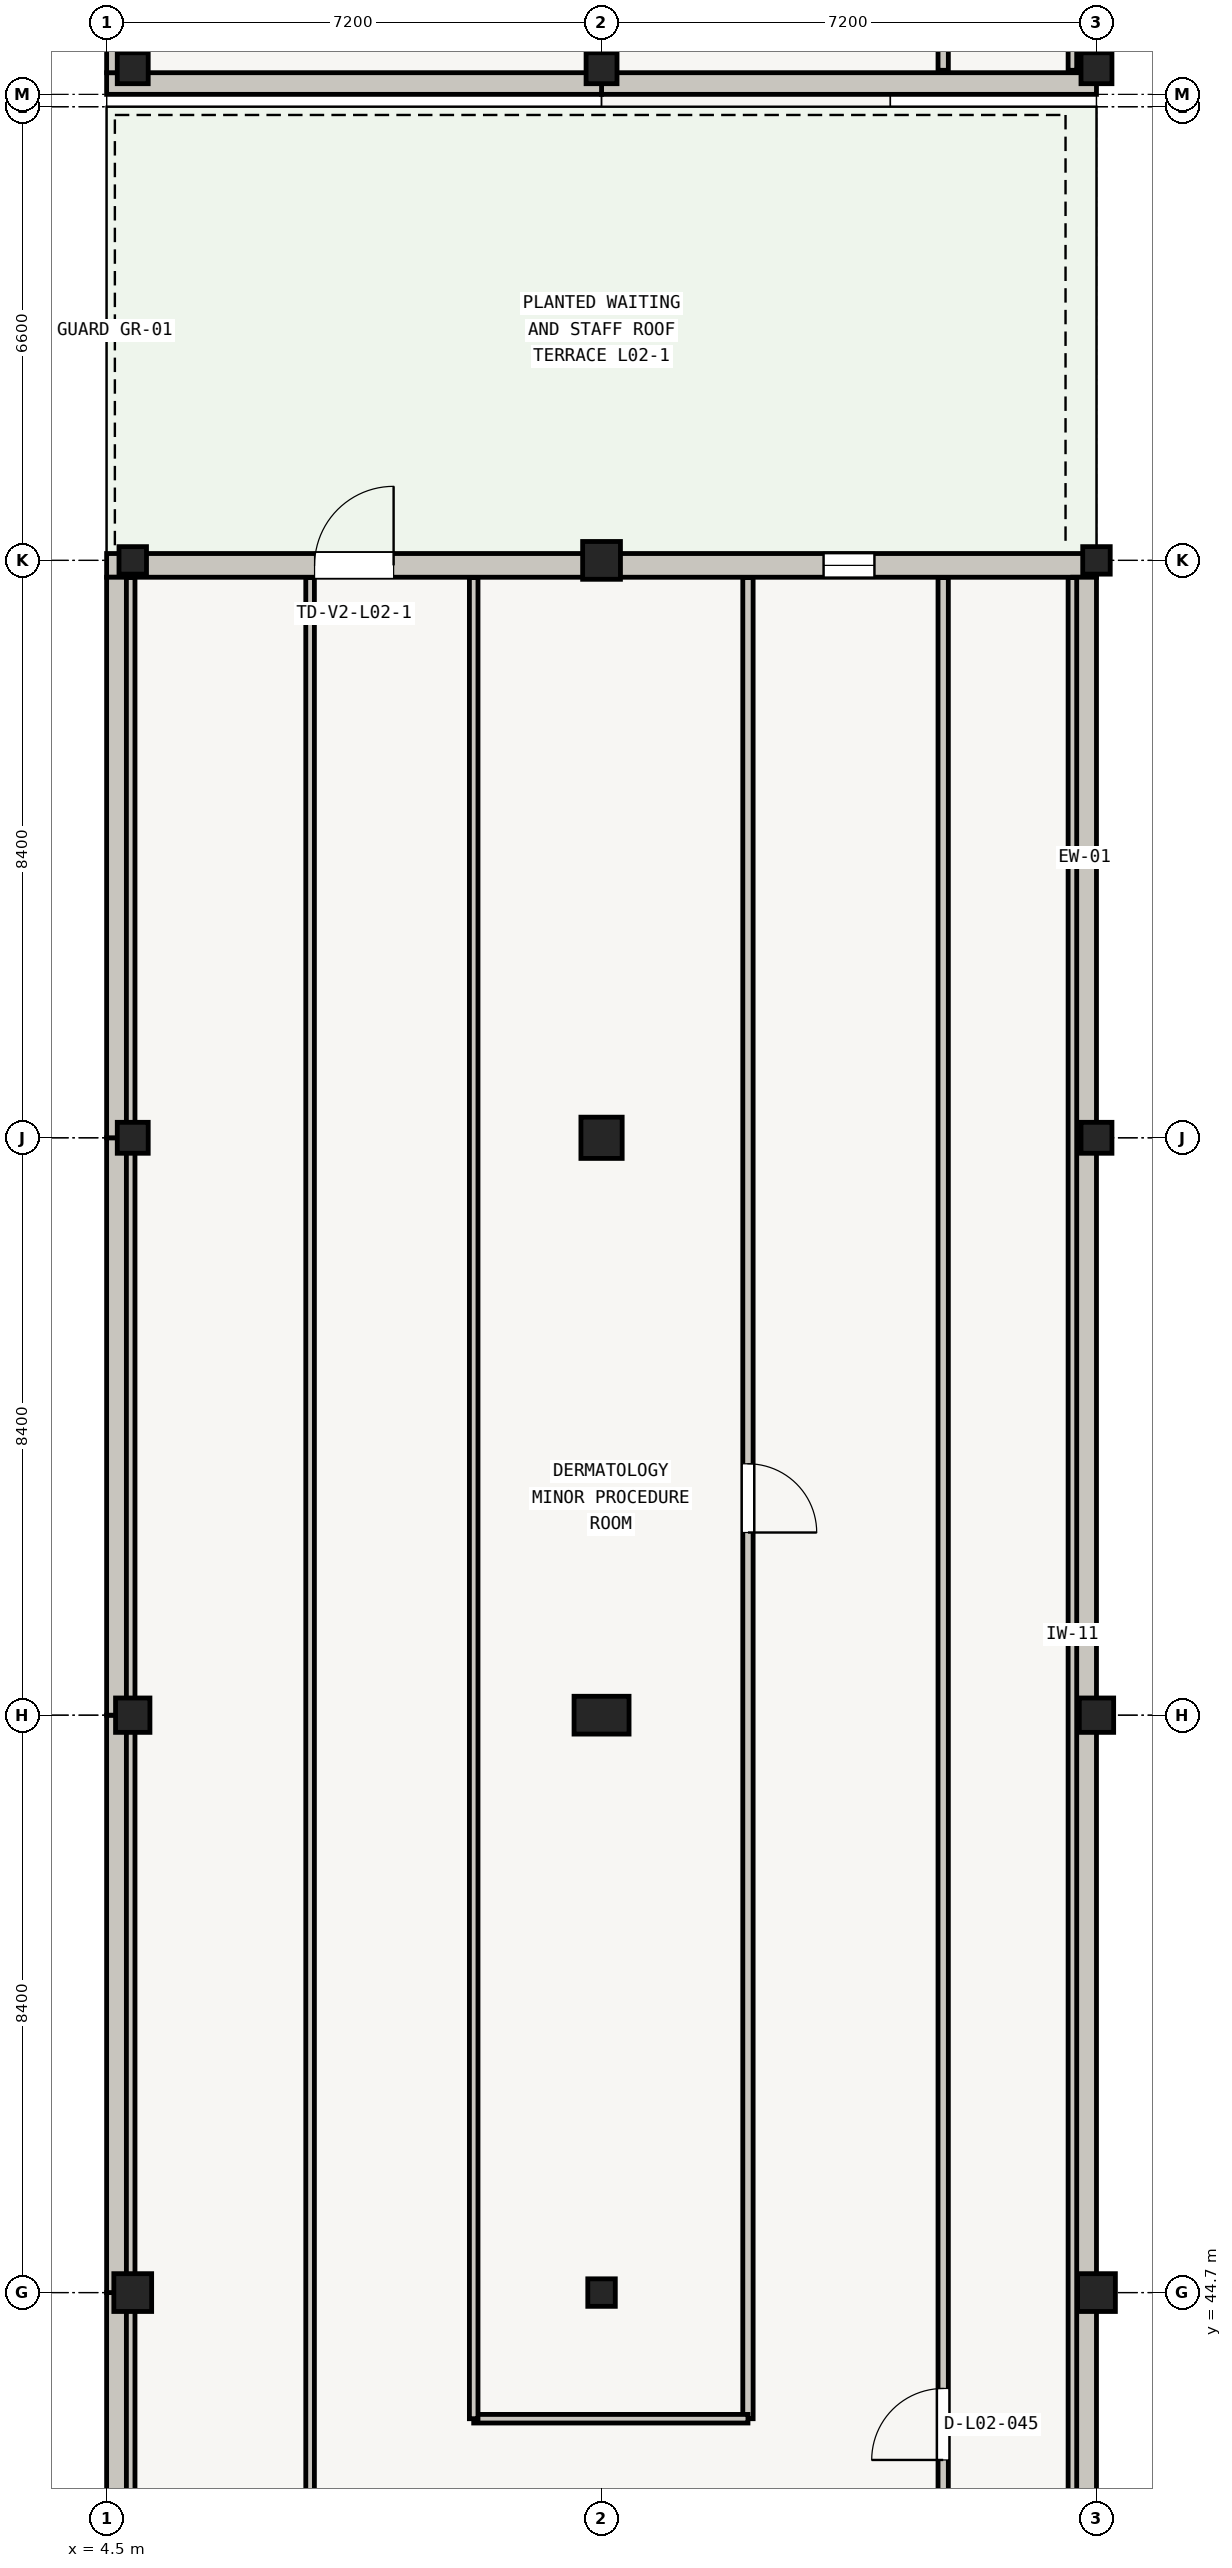
"""IFC4 building model, lengths in metres.
Left out: names, types, materials, properties, quantities, classifications, styles, units other than length and angle.
Written with IfcOpenShell. Run it as: python <this file> out.ifc"""

import sys

from ifc_helpers import new_model, si_unit, direction, frame, frame_2d, origin, origin_2d, place, context, subcontext, project, spatial, rectangle, extrude, element, fill, save


model = new_model("IFC4")
c1 = context("Model", 3, precision=1e-05, world=origin(), true_north=direction((0.0, 1.0)))
c2 = subcontext(c1, "Body", "Model", "MODEL_VIEW")
j1 = project(units=[si_unit("LENGTHUNIT", "METRE"), si_unit("PLANEANGLEUNIT", "RADIAN")], contexts=[c1])
p1 = place(None, origin())
s1 = spatial("IfcSite", under=j1, at=p1, CompositionType="ELEMENT")
p2 = place(p1, origin())
s2 = spatial("IfcBuilding", under=s1, at=p2, CompositionType="ELEMENT")
p3 = place(p2, frame((0.0, 0.0, 8.7)))
s3 = spatial("IfcBuildingStorey", under=s2, at=p3, CompositionType="ELEMENT", Elevation=8.7)
p4 = place(p3, frame((4.88, 44.7, 0.0), z_axis=(0.0, 0.0, 1.0), x_axis=(1.0, 0.0, 0.0)))
e1 = element("IfcColumn", 1, at=p4, inside=s3, PredefinedType="COLUMN", context=c2, shape_type="SweptSolid", body=[
    extrude(rectangle(XDim=0.55, YDim=0.55, at=origin_2d()), origin(), (0.0, 0.0, 1.0), 3.92),
])
p5 = place(p3, frame((4.88, 53.1, 0.0), z_axis=(0.0, 0.0, 1.0), x_axis=(1.0, 0.0, 0.0)))
e2 = element("IfcColumn", 2, at=p5, inside=s3, PredefinedType="COLUMN", context=c2, shape_type="SweptSolid", body=[
    extrude(rectangle(XDim=0.5, YDim=0.5, at=origin_2d()), origin(), (0.0, 0.0, 1.0), 3.92),
])
p6 = place(p3, frame((4.88, 61.5, 0.0), z_axis=(0.0, 0.0, 1.0), x_axis=(1.0, 0.0, 0.0)))
e3 = element("IfcColumn", 3, at=p6, inside=s3, PredefinedType="COLUMN", context=c2, shape_type="SweptSolid", body=[
    extrude(rectangle(XDim=0.45, YDim=0.45, at=origin_2d()), origin(), (0.0, 0.0, 1.0), 3.92),
])
for number, where, z_axis, x_axis in (
    (4, (4.88, 69.9, 0.0), (0.0, 0.0, 1.0), (1.0, 0.0, 0.0)),
    (5, (11.7, 44.7, 0.0), (0.0, 0.0, 1.0), (1.0, 0.0, 0.0)),
):
    element("IfcColumn", number, at=place(p3, frame(where, z_axis=z_axis, x_axis=x_axis)), inside=s3, PredefinedType="COLUMN", context=c2, shape_type="SweptSolid", body=[
        extrude(rectangle(XDim=0.4, YDim=0.4, at=origin_2d()), origin(), (0.0, 0.0, 1.0), 3.92),
    ])
p7 = place(p3, frame((11.7, 53.1, 0.0), z_axis=(0.0, 0.0, 1.0), x_axis=(1.0, 0.0, 0.0)))
e6 = element("IfcColumn", 6, at=p7, inside=s3, PredefinedType="COLUMN", context=c2, shape_type="SweptSolid", body=[
    extrude(rectangle(XDim=0.8, YDim=0.55, at=origin_2d()), origin(), (0.0, 0.0, 1.0), 3.92),
])
p8 = place(p3, frame((11.7, 61.5, 0.0), z_axis=(0.0, 0.0, 1.0), x_axis=(1.0, 0.0, 0.0)))
e7 = element("IfcColumn", 7, at=p8, inside=s3, PredefinedType="COLUMN", context=c2, shape_type="SweptSolid", body=[
    extrude(rectangle(XDim=0.6, YDim=0.6, at=origin_2d()), origin(), (0.0, 0.0, 1.0), 3.92),
])
for number, where, z_axis, x_axis in (
    (8, (11.7, 69.9, 0.0), (0.0, 0.0, 1.0), (1.0, 0.0, 0.0)),
    (9, (18.9, 44.7, 0.0), (0.0, 0.0, 1.0), (1.0, 0.0, 0.0)),
):
    element("IfcColumn", number, at=place(p3, frame(where, z_axis=z_axis, x_axis=x_axis)), inside=s3, PredefinedType="COLUMN", context=c2, shape_type="SweptSolid", body=[
        extrude(rectangle(XDim=0.55, YDim=0.55, at=origin_2d()), origin(), (0.0, 0.0, 1.0), 3.92),
    ])
p9 = place(p3, frame((18.9, 53.1, 0.0), z_axis=(0.0, 0.0, 1.0), x_axis=(1.0, 0.0, 0.0)))
e10 = element("IfcColumn", 10, at=p9, inside=s3, PredefinedType="COLUMN", context=c2, shape_type="SweptSolid", body=[
    extrude(rectangle(XDim=0.5, YDim=0.5, at=origin_2d()), origin(), (0.0, 0.0, 1.0), 3.92),
])
p10 = place(p3, frame((18.9, 61.5, 0.0), z_axis=(0.0, 0.0, 1.0), x_axis=(1.0, 0.0, 0.0)))
e11 = element("IfcColumn", 11, at=p10, inside=s3, PredefinedType="COLUMN", context=c2, shape_type="SweptSolid", body=[
    extrude(rectangle(XDim=0.45, YDim=0.45, at=origin_2d()), origin(), (0.0, 0.0, 1.0), 3.92),
])
p11 = place(p3, frame((18.9, 69.9, 0.0), z_axis=(0.0, 0.0, 1.0), x_axis=(1.0, 0.0, 0.0)))
e12 = element("IfcColumn", 12, at=p11, inside=s3, PredefinedType="COLUMN", context=c2, shape_type="SweptSolid", body=[
    extrude(rectangle(XDim=0.4, YDim=0.4, at=origin_2d()), origin(), (0.0, 0.0, 1.0), 3.92),
])
for number, where, z_axis, x_axis in (
    (13, (4.88, 77.06, 0.0), (0.0, 0.0, 1.0), (1.0, 0.0, 0.0)),
    (14, (11.7, 77.06, 0.0), (0.0, 0.0, 1.0), (1.0, 0.0, 0.0)),
    (15, (18.9, 77.06, 0.0), (0.0, 0.0, 1.0), (1.0, 0.0, 0.0)),
):
    element("IfcColumn", number, at=place(p3, frame(where, z_axis=z_axis, x_axis=x_axis)), inside=s3, PredefinedType="COLUMN", context=c2, shape_type="SweptSolid", body=[
        extrude(rectangle(XDim=0.45, YDim=0.45, at=origin_2d()), origin(), (0.0, 0.0, 1.0), 3.935),
    ])
p12 = place(p3, frame((4.5, 69.827, 0.0), z_axis=(0.0, 0.0, 1.0), x_axis=(1.0, 0.0, 0.0)))
e16 = element("IfcWall", 16, at=p12, inside=s3, PredefinedType="SOLIDWALL", context=c2, shape_type="SweptSolid", body=[
    extrude(rectangle(XDim=7.2, YDim=0.345, at=frame_2d((3.6, 0.0))), origin(), (0.0, 0.0, 1.0), 3.405),
])
p13 = place(p12, frame((3.025, 0.0, 0.19)))
e17 = element("IfcOpeningElement", 17, at=p13, cuts=e16, PredefinedType="OPENING", context=c2, shape_type="SweptSolid", body=[
    extrude(rectangle(XDim=1.15, YDim=2.02, at=frame_2d((0.575, 1.01))), frame((0.0, 0.172, 0.0), z_axis=(0.0, -1.0, 0.0), x_axis=(1.0, 0.0, 0.0)), (0.0, 0.0, 1.0), 0.345),
])
p14 = place(p3, frame((11.7, 69.827, 0.0), z_axis=(0.0, 0.0, 1.0), x_axis=(1.0, 0.0, 0.0)))
e18 = element("IfcWall", 18, at=p14, inside=s3, PredefinedType="SOLIDWALL", context=c2, shape_type="SweptSolid", body=[
    extrude(rectangle(XDim=7.2, YDim=0.345, at=frame_2d((3.6, 0.0))), origin(), (0.0, 0.0, 1.0), 3.105),
])
p15 = place(p14, frame((3.23, 0.0, 0.55)))
e19 = element("IfcOpeningElement", 19, at=p15, cuts=e18, PredefinedType="OPENING", context=c2, shape_type="SweptSolid", body=[
    extrude(rectangle(XDim=0.74, YDim=2.04, at=frame_2d((0.37, 1.02))), frame((0.0, 0.172, 0.0), z_axis=(0.0, -1.0, 0.0), x_axis=(1.0, 0.0, 0.0)), (0.0, 0.0, 1.0), 0.345),
])
p16 = place(p3, frame((18.728, 69.655, 0.0), z_axis=(0.0, 0.0, 1.0), x_axis=(0.0, -1.0, 0.0)))
e20 = element("IfcWall", 20, at=p16, inside=s3, PredefinedType="SOLIDWALL", context=c2, shape_type="SweptSolid", body=[
    extrude(rectangle(XDim=8.155, YDim=0.345, at=frame_2d((4.078, 0.0))), origin(), (0.0, 0.0, 1.0), 2.955),
])
p17 = place(p3, frame((18.728, 61.5, 0.0), z_axis=(0.0, 0.0, 1.0), x_axis=(0.0, -1.0, 0.0)))
e21 = element("IfcWall", 21, at=p17, inside=s3, PredefinedType="SOLIDWALL", context=c2, shape_type="SweptSolid", body=[
    extrude(rectangle(XDim=8.4, YDim=0.345, at=frame_2d((4.2, 0.0))), origin(), (0.0, 0.0, 1.0), 2.955),
])
p18 = place(p3, frame((18.728, 53.1, 0.0), z_axis=(0.0, 0.0, 1.0), x_axis=(0.0, -1.0, 0.0)))
e22 = element("IfcWall", 22, at=p18, inside=s3, PredefinedType="SOLIDWALL", context=c2, shape_type="SweptSolid", body=[
    extrude(rectangle(XDim=8.4, YDim=0.345, at=frame_2d((4.2, 0.0))), origin(), (0.0, 0.0, 1.0), 3.105),
])
p19 = place(p3, frame((18.728, 44.7, 0.0), z_axis=(0.0, 0.0, 1.0), x_axis=(0.0, -1.0, 0.0)))
e23 = element("IfcWall", 23, at=p19, inside=s3, PredefinedType="SOLIDWALL", context=c2, shape_type="SweptSolid", body=[
    extrude(rectangle(XDim=8.4, YDim=0.345, at=frame_2d((4.2, 0.0))), origin(), (0.0, 0.0, 1.0), 3.185),
])
p20 = place(p3, frame((4.673, 36.3, 0.0), z_axis=(0.0, 0.0, 1.0), x_axis=(0.0, 1.0, 0.0)))
e24 = element("IfcWall", 24, at=p20, inside=s3, PredefinedType="SOLIDWALL", context=c2, shape_type="SweptSolid", body=[
    extrude(rectangle(XDim=8.4, YDim=0.345, at=frame_2d((4.2, 0.0))), origin(), (0.0, 0.0, 1.0), 2.955),
])
p21 = place(p3, frame((4.673, 44.7, 0.0), z_axis=(0.0, 0.0, 1.0), x_axis=(0.0, 1.0, 0.0)))
e25 = element("IfcWall", 25, at=p21, inside=s3, PredefinedType="SOLIDWALL", context=c2, shape_type="SweptSolid", body=[
    extrude(rectangle(XDim=8.4, YDim=0.345, at=frame_2d((4.2, 0.0))), origin(), (0.0, 0.0, 1.0), 2.955),
])
p22 = place(p3, frame((4.673, 53.1, 0.0), z_axis=(0.0, 0.0, 1.0), x_axis=(0.0, 1.0, 0.0)))
e26 = element("IfcWall", 26, at=p22, inside=s3, PredefinedType="SOLIDWALL", context=c2, shape_type="SweptSolid", body=[
    extrude(rectangle(XDim=8.4, YDim=0.345, at=frame_2d((4.2, 0.0))), origin(), (0.0, 0.0, 1.0), 3.325),
])
p23 = place(p3, frame((4.673, 61.5, 0.0), z_axis=(0.0, 0.0, 1.0), x_axis=(0.0, 1.0, 0.0)))
e27 = element("IfcWall", 27, at=p23, inside=s3, PredefinedType="SOLIDWALL", context=c2, shape_type="SweptSolid", body=[
    extrude(rectangle(XDim=8.155, YDim=0.345, at=frame_2d((4.078, 0.0))), origin(), (0.0, 0.0, 1.0), 3.355),
])
for number, where, z_axis, x_axis in (
    (28, (18.9, 76.837, 0.0), (0.0, 0.0, 1.0), (-1.0, 0.0, 0.0)),
    (29, (11.7, 76.837, 0.0), (0.0, 0.0, 1.0), (-1.0, 0.0, 0.0)),
):
    element("IfcWall", number, at=place(p3, frame(where, z_axis=z_axis, x_axis=x_axis)), inside=s3, PredefinedType="SOLIDWALL", context=c2, shape_type="SweptSolid", body=[
        extrude(rectangle(XDim=7.2, YDim=0.315, at=frame_2d((3.6, 0.0))), origin(), (0.0, 0.0, 1.0), 3.32),
    ])
p24 = place(p3, frame((4.657, 76.995, 0.0), z_axis=(0.0, 0.0, 1.0), x_axis=(0.0, 1.0, 0.0)))
e30 = element("IfcWall", 30, at=p24, inside=s3, PredefinedType="SOLIDWALL", context=c2, shape_type="SweptSolid", body=[
    extrude(rectangle(XDim=9.705, YDim=0.315, at=frame_2d((4.853, 0.0))), origin(), (0.0, 0.0, 1.0), 3.27),
])
p25 = place(p24, frame((1.959, 0.0, 0.55)))
e31 = element("IfcOpeningElement", 31, at=p25, cuts=e30, PredefinedType="OPENING", context=c2, shape_type="SweptSolid", body=[
    extrude(rectangle(XDim=0.74, YDim=2.25, at=frame_2d((0.37, 1.125))), frame((0.0, 0.157, 0.0), z_axis=(0.0, -1.0, 0.0), x_axis=(1.0, 0.0, 0.0)), (0.0, 0.0, 1.0), 0.315),
])
p26 = place(p24, frame((4.482, 0.0, 0.55)))
e32 = element("IfcOpeningElement", 32, at=p26, cuts=e30, PredefinedType="OPENING", context=c2, shape_type="SweptSolid", body=[
    extrude(rectangle(XDim=0.74, YDim=2.25, at=frame_2d((0.37, 1.125))), frame((0.0, 0.157, 0.0), z_axis=(0.0, -1.0, 0.0), x_axis=(1.0, 0.0, 0.0)), (0.0, 0.0, 1.0), 0.315),
])
p27 = place(p24, frame((7.006, 0.0, 0.55)))
e33 = element("IfcOpeningElement", 33, at=p27, cuts=e30, PredefinedType="OPENING", context=c2, shape_type="SweptSolid", body=[
    extrude(rectangle(XDim=0.74, YDim=2.25, at=frame_2d((0.37, 1.125))), frame((0.0, 0.157, 0.0), z_axis=(0.0, -1.0, 0.0), x_axis=(1.0, 0.0, 0.0)), (0.0, 0.0, 1.0), 0.315),
])
p28 = place(p3, frame((16.67, 15.92, 0.0), z_axis=(0.0, 0.0, 1.0), x_axis=(0.0, 1.0, 0.0)))
e34 = element("IfcWall", 34, at=p28, inside=s3, PredefinedType="PARTITIONING", context=c2, shape_type="SweptSolid", body=[
    extrude(rectangle(XDim=53.73, YDim=0.15, at=frame_2d((26.865, 0.0))), origin(), (0.0, 0.0, 1.0), 2.94),
])
p29 = place(p28, frame((26.345, 0.0, 0.0)))
e35 = element("IfcOpeningElement", 35, at=p29, cuts=e34, PredefinedType="OPENING", context=c2, shape_type="SweptSolid", body=[
    extrude(rectangle(XDim=1.04, YDim=2.05, at=frame_2d((0.52, 1.025))), frame((0.0, 0.075, 0.0), z_axis=(0.0, -1.0, 0.0), x_axis=(1.0, 0.0, 0.0)), (0.0, 0.0, 1.0), 0.15),
])
p30 = place(p3, frame((18.55, 69.65, 0.0), z_axis=(0.0, 0.0, 1.0), x_axis=(0.0, -1.0, 0.0)))
e36 = element("IfcWall", 36, at=p30, inside=s3, PredefinedType="PARTITIONING", context=c2, shape_type="SweptSolid", body=[
    extrude(rectangle(XDim=50.75, YDim=0.125, at=frame_2d((25.375, 0.0))), origin(), (0.0, 0.0, 1.0), 2.94),
])
p31 = place(p3, frame((7.46, 69.65, 0.0), z_axis=(0.0, 0.0, 1.0), x_axis=(0.0, -1.0, 0.0)))
e37 = element("IfcWall", 37, at=p31, inside=s3, PredefinedType="PARTITIONING", context=c2, shape_type="SweptSolid", body=[
    extrude(rectangle(XDim=43.8, YDim=0.125, at=frame_2d((21.9, 0.0))), origin(), (0.0, 0.0, 1.0), 2.94),
])
p32 = place(p3, frame((4.85, 15.92, 0.0), z_axis=(0.0, 0.0, 1.0), x_axis=(0.0, 1.0, 0.0)))
e38 = element("IfcWall", 38, at=p32, inside=s3, PredefinedType="PARTITIONING", context=c2, shape_type="SweptSolid", body=[
    extrude(rectangle(XDim=53.73, YDim=0.125, at=frame_2d((26.865, 0.0))), origin(), (0.0, 0.0, 1.0), 2.94),
])
p33 = place(p3, frame((13.83, 69.65, 0.0), z_axis=(0.0, 0.0, 1.0), x_axis=(0.0, -1.0, 0.0)))
e39 = element("IfcWall", 39, at=p33, inside=s3, PredefinedType="PARTITIONING", context=c2, shape_type="SweptSolid", body=[
    extrude(rectangle(XDim=26.785, YDim=0.15, at=frame_2d((13.393, 0.0))), origin(), (0.0, 0.0, 1.0), 2.94),
])
p34 = place(p33, frame((12.893, 0.0, 0.0)))
e40 = element("IfcOpeningElement", 40, at=p34, cuts=e39, PredefinedType="OPENING", context=c2, shape_type="SweptSolid", body=[
    extrude(rectangle(XDim=1.0, YDim=2.05, at=frame_2d((0.5, 1.025))), frame((0.0, 0.075, 0.0), z_axis=(0.0, -1.0, 0.0), x_axis=(1.0, 0.0, 0.0)), (0.0, 0.0, 1.0), 0.15),
])
p35 = place(p3, frame((13.83, 42.865, 0.0), z_axis=(0.0, 0.0, 1.0), x_axis=(-1.0, 0.0, 0.0)))
e41 = element("IfcWall", 41, at=p35, inside=s3, PredefinedType="PARTITIONING", context=c2, shape_type="SweptSolid", body=[
    extrude(rectangle(XDim=3.99, YDim=0.125, at=frame_2d((1.995, 0.0))), origin(), (0.0, 0.0, 1.0), 2.94),
])
p36 = place(p3, frame((9.84, 42.865, 0.0), z_axis=(0.0, 0.0, 1.0), x_axis=(0.0, 1.0, 0.0)))
e42 = element("IfcWall", 42, at=p36, inside=s3, PredefinedType="PARTITIONING", context=c2, shape_type="SweptSolid", body=[
    extrude(rectangle(XDim=26.785, YDim=0.125, at=frame_2d((13.393, 0.0))), origin(), (0.0, 0.0, 1.0), 2.94),
])
p37 = place(p3, frame((16.67, 77.03, 0.0), z_axis=(0.0, 0.0, 1.0), x_axis=(0.0, 1.0, 0.0)))
e43 = element("IfcWall", 43, at=p37, inside=s3, PredefinedType="PARTITIONING", context=c2, shape_type="SweptSolid", body=[
    extrude(rectangle(XDim=22.859, YDim=0.15, at=frame_2d((11.43, 0.0))), origin(), (0.0, 0.0, 1.0), 2.955),
])
p38 = place(p37, frame((10.909, 0.0, 0.0)))
e44 = element("IfcOpeningElement", 44, at=p38, cuts=e43, PredefinedType="OPENING", context=c2, shape_type="SweptSolid", body=[
    extrude(rectangle(XDim=1.04, YDim=2.05, at=frame_2d((0.52, 1.025))), frame((0.0, 0.075, 0.0), z_axis=(0.0, -1.0, 0.0), x_axis=(1.0, 0.0, 0.0)), (0.0, 0.0, 1.0), 0.15),
])
p39 = place(p3, frame((18.55, 99.889, 0.0), z_axis=(0.0, 0.0, 1.0), x_axis=(0.0, -1.0, 0.0)))
e45 = element("IfcWall", 45, at=p39, inside=s3, PredefinedType="PARTITIONING", context=c2, shape_type="SweptSolid", body=[
    extrude(rectangle(XDim=22.859, YDim=0.125, at=frame_2d((11.43, 0.0))), origin(), (0.0, 0.0, 1.0), 2.955),
])
p40 = place(p13, origin())
e46 = element("IfcDoor", 46, at=p40, inside=s3, OperationType="SINGLE_SWING_RIGHT", PredefinedType="DOOR", context=c2, shape_type="SweptSolid", body=[
    extrude(rectangle(XDim=1.15, YDim=2.02, at=frame_2d((0.575, 1.01))), frame((0.0, 0.025, 0.0), z_axis=(0.0, -1.0, 0.0), x_axis=(1.0, 0.0, 0.0)), (0.0, 0.0, 1.0), 0.05),
])
fill(e17, e46)
p41 = place(p15, origin())
e47 = element("IfcWindow", 47, at=p41, inside=s3, PartitioningType="SINGLE_PANEL", PredefinedType="WINDOW", context=c2, shape_type="SweptSolid", body=[
    extrude(rectangle(XDim=0.74, YDim=2.04, at=frame_2d((0.37, 1.02))), frame((0.0, 0.03, 0.0), z_axis=(0.0, -1.0, 0.0), x_axis=(1.0, 0.0, 0.0)), (0.0, 0.0, 1.0), 0.06),
])
fill(e19, e47)
p42 = place(p29, origin())
e48 = element("IfcDoor", 48, at=p42, inside=s3, OperationType="SINGLE_SWING_LEFT", PredefinedType="DOOR", context=c2, shape_type="SweptSolid", body=[
    extrude(rectangle(XDim=1.04, YDim=2.05, at=frame_2d((0.52, 1.025))), frame((0.0, 0.025, 0.0), z_axis=(0.0, -1.0, 0.0), x_axis=(1.0, 0.0, 0.0)), (0.0, 0.0, 1.0), 0.05),
])
fill(e35, e48)
p43 = place(p34, origin())
e49 = element("IfcDoor", 49, at=p43, inside=s3, OperationType="SINGLE_SWING_RIGHT", PredefinedType="DOOR", context=c2, shape_type="SweptSolid", body=[
    extrude(rectangle(XDim=1.0, YDim=2.05, at=frame_2d((0.5, 1.025))), frame((0.0, 0.025, 0.0), z_axis=(0.0, -1.0, 0.0), x_axis=(1.0, 0.0, 0.0)), (0.0, 0.0, 1.0), 0.05),
])
fill(e40, e49)
save(model, sys.argv[1])
